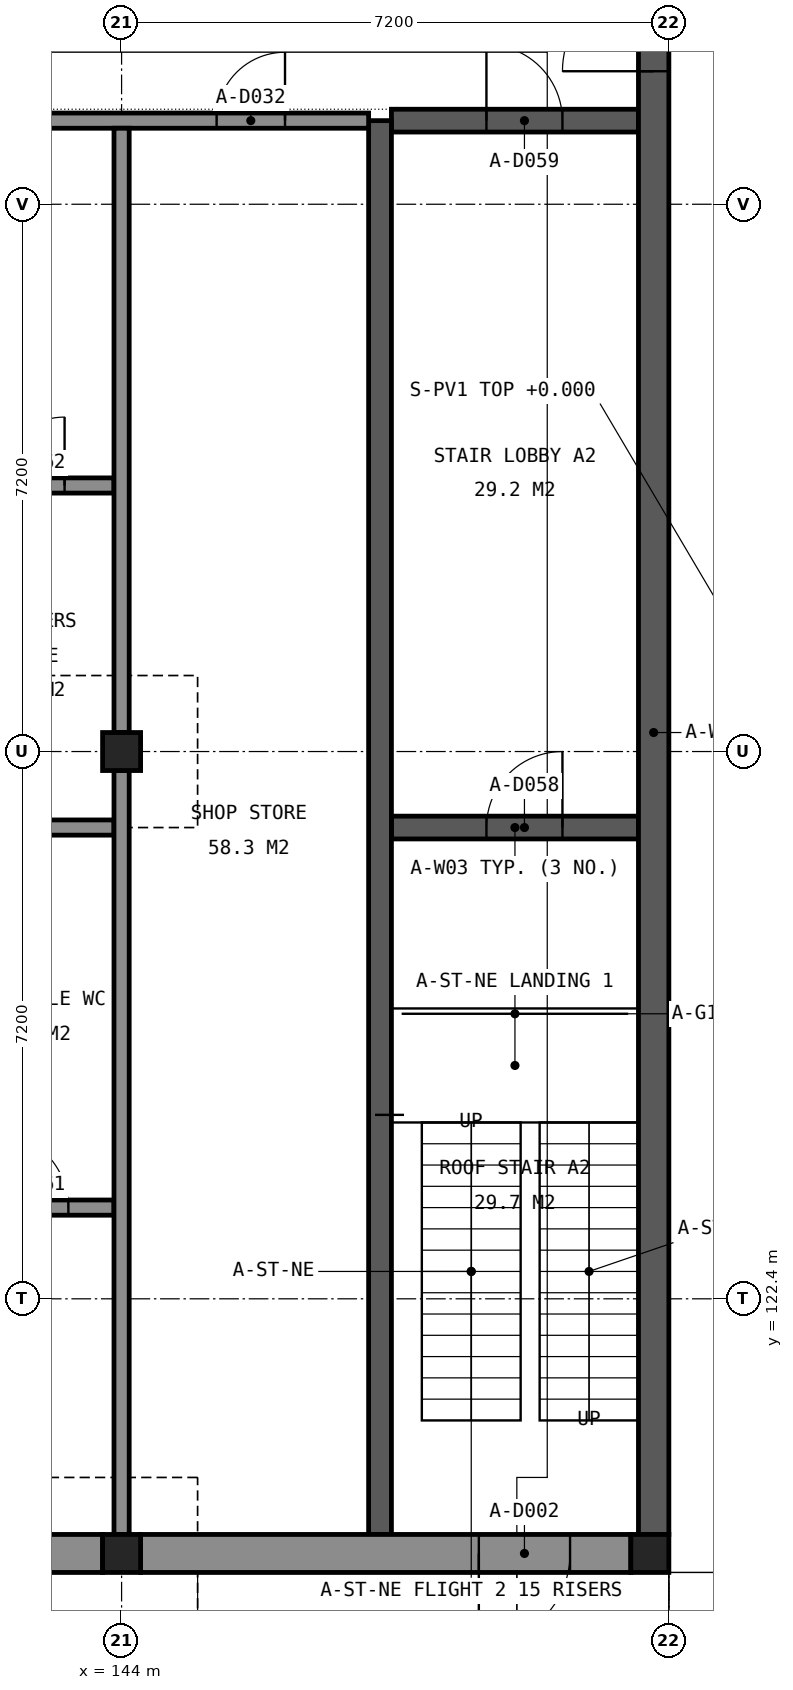
"""IFC4 building model, lengths in metres.
Left out: names, types, materials, properties, quantities, classifications, styles, units other than length and angle.
Written with IfcOpenShell. Run it as: python <this file> out.ifc"""

import sys

from ifc_helpers import new_model, si_unit, direction, frame, frame_2d, origin, origin_2d, place, context, subcontext, project, spatial, rectangle, extrude, element, fill, save


model = new_model("IFC4")
c1 = context("Model", 3, precision=1e-05, world=origin(), true_north=direction((0.0, 1.0)))
c2 = subcontext(c1, "Body", "Model", "MODEL_VIEW")
j1 = project(units=[si_unit("LENGTHUNIT", "METRE"), si_unit("PLANEANGLEUNIT", "RADIAN")], contexts=[c1])
p1 = place(None, origin())
s1 = spatial("IfcSite", under=j1, at=p1, CompositionType="ELEMENT")
p2 = place(p1, origin())
s2 = spatial("IfcBuilding", under=s1, at=p2, CompositionType="ELEMENT")
p3 = place(p2, origin())
s3 = spatial("IfcBuildingStorey", under=s2, at=p3, CompositionType="ELEMENT", Elevation=0.0)
for number, where, z_axis, x_axis in (
    (1, (144.0, 119.05, 0.0), (0.0, 0.0, 1.0), (1.0, 0.0, 0.0)),
    (2, (150.95, 119.05, 0.0), (0.0, 0.0, 1.0), (1.0, 0.0, 0.0)),
    (3, (144.0, 129.6, 0.0), (0.0, 0.0, 1.0), (1.0, 0.0, 0.0)),
):
    element("IfcColumn", number, at=place(p3, frame(where, z_axis=z_axis, x_axis=x_axis)), inside=s3, PredefinedType="COLUMN", context=c2, shape_type="SweptSolid", body=[
        extrude(rectangle(XDim=0.5, YDim=0.5, at=origin_2d()), origin(), (0.0, 0.0, 1.0), 3.7),
    ])
p4 = place(p3, frame((147.55, 128.6, 0.0), z_axis=(0.0, 0.0, 1.0), x_axis=(1.0, 0.0, 0.0)))
e4 = element("IfcWall", 4, at=p4, inside=s3, PredefinedType="SHEAR", context=c2, shape_type="SweptSolid", body=[
    extrude(rectangle(XDim=3.25, YDim=0.3, at=frame_2d((1.625, 0.0))), origin(), (0.0, 0.0, 1.0), 4.4),
])
p5 = place(p4, frame((1.25, 0.0, 0.0)))
e5 = element("IfcOpeningElement", 5, at=p5, cuts=e4, PredefinedType="OPENING", context=c2, shape_type="SweptSolid", body=[
    extrude(rectangle(XDim=1.0, YDim=2.1, at=frame_2d((0.5, 1.05))), frame((0.0, 0.16, 0.0), z_axis=(0.0, -1.0, 0.0), x_axis=(1.0, 0.0, 0.0)), (0.0, 0.0, 1.0), 0.32),
])
p6 = place(p3, frame((147.55, 137.9, 0.0), z_axis=(0.0, 0.0, 1.0), x_axis=(1.0, 0.0, 0.0)))
e6 = element("IfcWall", 6, at=p6, inside=s3, PredefinedType="SHEAR", context=c2, shape_type="SweptSolid", body=[
    extrude(rectangle(XDim=3.25, YDim=0.3, at=frame_2d((1.625, 0.0))), origin(), (0.0, 0.0, 1.0), 4.4),
])
p7 = place(p6, frame((1.25, 0.0, 0.0)))
e7 = element("IfcOpeningElement", 7, at=p7, cuts=e6, PredefinedType="OPENING", context=c2, shape_type="SweptSolid", body=[
    extrude(rectangle(XDim=1.0, YDim=2.1, at=frame_2d((0.5, 1.05))), frame((0.0, 0.16, 0.0), z_axis=(0.0, -1.0, 0.0), x_axis=(1.0, 0.0, 0.0)), (0.0, 0.0, 1.0), 0.32),
])
p8 = place(p3, frame((147.4, 119.3, 0.0), z_axis=(0.0, 0.0, 1.0), x_axis=(0.0, 1.0, 0.0)))
e8 = element("IfcWall", 8, at=p8, inside=s3, PredefinedType="SHEAR", context=c2, shape_type="SweptSolid", body=[
    extrude(rectangle(XDim=18.6, YDim=0.3, at=frame_2d((9.3, 0.0))), origin(), (0.0, 0.0, 1.0), 4.4),
])
p9 = place(p3, frame((151.0, 119.3, 0.0), z_axis=(0.0, 0.0, 1.0), x_axis=(0.0, 1.0, 0.0)))
e9 = element("IfcWall", 9, at=p9, inside=s3, PredefinedType="SHEAR", context=c2, shape_type="SweptSolid", body=[
    extrude(rectangle(XDim=21.1, YDim=0.4, at=frame_2d((10.55, 0.0))), origin(), (0.0, 0.0, 1.0), 4.4),
])
p10 = place(p9, frame((19.25, 0.0, 0.0)))
e10 = element("IfcOpeningElement", 10, at=p10, cuts=e9, PredefinedType="OPENING", context=c2, shape_type="SweptSolid", body=[
    extrude(rectangle(XDim=1.2, YDim=2.1, at=frame_2d((0.6, 1.05))), frame((0.0, 0.21, 0.0), z_axis=(0.0, -1.0, 0.0), x_axis=(1.0, 0.0, 0.0)), (0.0, 0.0, 1.0), 0.42),
])
p11 = place(p3, frame((137.05, 119.05, 0.0), z_axis=(0.0, 0.0, 1.0), x_axis=(1.0, 0.0, 0.0)))
e11 = element("IfcWall", 11, at=p11, inside=s3, PredefinedType="SOLIDWALL", context=c2, shape_type="SweptSolid", body=[
    extrude(rectangle(XDim=6.7, YDim=0.5, at=frame_2d((3.35, 0.0))), origin(), (0.0, 0.0, 1.0), 3.6),
])
p12 = place(p11, frame((2.75, 0.0, 0.0)))
e12 = element("IfcOpeningElement", 12, at=p12, cuts=e11, PredefinedType="OPENING", context=c2, shape_type="SweptSolid", body=[
    extrude(rectangle(XDim=1.2, YDim=2.1, at=frame_2d((0.6, 1.05))), frame((0.0, 0.26, 0.0), z_axis=(0.0, -1.0, 0.0), x_axis=(1.0, 0.0, 0.0)), (0.0, 0.0, 1.0), 0.52),
])
p13 = place(p3, frame((144.25, 119.05, 0.0), z_axis=(0.0, 0.0, 1.0), x_axis=(1.0, 0.0, 0.0)))
e13 = element("IfcWall", 13, at=p13, inside=s3, PredefinedType="SOLIDWALL", context=c2, shape_type="SweptSolid", body=[
    extrude(rectangle(XDim=6.45, YDim=0.5, at=frame_2d((3.225, 0.0))), origin(), (0.0, 0.0, 1.0), 3.6),
])
p14 = place(p13, frame((5.65, 0.0, 0.0), z_axis=(0.0, 0.0, 1.0), x_axis=(-1.0, 0.0, 0.0)))
e14 = element("IfcOpeningElement", 14, at=p14, cuts=e13, PredefinedType="OPENING", context=c2, shape_type="SweptSolid", body=[
    extrude(rectangle(XDim=1.2, YDim=2.1, at=frame_2d((0.6, 1.05))), frame((0.0, 0.26, 0.0), z_axis=(0.0, -1.0, 0.0), x_axis=(1.0, 0.0, 0.0)), (0.0, 0.0, 1.0), 0.52),
])
p15 = place(p3, frame((136.9, 123.6, 0.0), z_axis=(0.0, 0.0, 1.0), x_axis=(1.0, 0.0, 0.0)))
e15 = element("IfcWall", 15, at=p15, inside=s3, PredefinedType="PARTITIONING", context=c2, shape_type="SweptSolid", body=[
    extrude(rectangle(XDim=7.0, YDim=0.2, at=frame_2d((3.5, 0.0))), origin(), (0.0, 0.0, 1.0), 3.5),
])
p16 = place(p15, frame((1.8, 0.0, 0.0)))
e16 = element("IfcOpeningElement", 16, at=p16, cuts=e15, PredefinedType="OPENING", context=c2, shape_type="SweptSolid", body=[
    extrude(rectangle(XDim=1.0, YDim=2.1, at=frame_2d((0.5, 1.05))), frame((0.0, 0.11, 0.0), z_axis=(0.0, -1.0, 0.0), x_axis=(1.0, 0.0, 0.0)), (0.0, 0.0, 1.0), 0.22),
])
p17 = place(p15, frame((5.4, 0.0, 0.0)))
e17 = element("IfcOpeningElement", 17, at=p17, cuts=e15, PredefinedType="OPENING", context=c2, shape_type="SweptSolid", body=[
    extrude(rectangle(XDim=1.0, YDim=2.1, at=frame_2d((0.5, 1.05))), frame((0.0, 0.11, 0.0), z_axis=(0.0, -1.0, 0.0), x_axis=(1.0, 0.0, 0.0)), (0.0, 0.0, 1.0), 0.22),
])
p18 = place(p3, frame((141.7, 128.6, 0.0), z_axis=(0.0, 0.0, 1.0), x_axis=(1.0, 0.0, 0.0)))
e18 = element("IfcWall", 18, at=p18, inside=s3, PredefinedType="PARTITIONING", context=c2, shape_type="SweptSolid", body=[
    extrude(rectangle(XDim=2.2, YDim=0.2, at=frame_2d((1.1, 0.0))), origin(), (0.0, 0.0, 1.0), 3.5),
])
p19 = place(p3, frame((57.7, 133.1, 0.0), z_axis=(0.0, 0.0, 1.0), x_axis=(1.0, 0.0, 0.0)))
e19 = element("IfcWall", 19, at=p19, inside=s3, PredefinedType="PARTITIONING", context=c2, shape_type="SweptSolid", body=[
    extrude(rectangle(XDim=86.2, YDim=0.2, at=frame_2d((43.1, 0.0))), origin(), (0.0, 0.0, 1.0), 3.5),
])
p20 = place(p19, frame((3.0, 0.0, 0.0)))
e20 = element("IfcOpeningElement", 20, at=p20, cuts=e19, PredefinedType="OPENING", context=c2, shape_type="SweptSolid", body=[
    extrude(rectangle(XDim=1.0, YDim=2.1, at=frame_2d((0.5, 1.05))), frame((0.0, 0.11, 0.0), z_axis=(0.0, -1.0, 0.0), x_axis=(1.0, 0.0, 0.0)), (0.0, 0.0, 1.0), 0.22),
])
p21 = place(p19, frame((10.2, 0.0, 0.0)))
e21 = element("IfcOpeningElement", 21, at=p21, cuts=e19, PredefinedType="OPENING", context=c2, shape_type="SweptSolid", body=[
    extrude(rectangle(XDim=1.0, YDim=2.1, at=frame_2d((0.5, 1.05))), frame((0.0, 0.11, 0.0), z_axis=(0.0, -1.0, 0.0), x_axis=(1.0, 0.0, 0.0)), (0.0, 0.0, 1.0), 0.22),
])
p22 = place(p19, frame((17.4, 0.0, 0.0)))
e22 = element("IfcOpeningElement", 22, at=p22, cuts=e19, PredefinedType="OPENING", context=c2, shape_type="SweptSolid", body=[
    extrude(rectangle(XDim=1.0, YDim=2.1, at=frame_2d((0.5, 1.05))), frame((0.0, 0.11, 0.0), z_axis=(0.0, -1.0, 0.0), x_axis=(1.0, 0.0, 0.0)), (0.0, 0.0, 1.0), 0.22),
])
p23 = place(p19, frame((24.6, 0.0, 0.0)))
e23 = element("IfcOpeningElement", 23, at=p23, cuts=e19, PredefinedType="OPENING", context=c2, shape_type="SweptSolid", body=[
    extrude(rectangle(XDim=1.0, YDim=2.1, at=frame_2d((0.5, 1.05))), frame((0.0, 0.11, 0.0), z_axis=(0.0, -1.0, 0.0), x_axis=(1.0, 0.0, 0.0)), (0.0, 0.0, 1.0), 0.22),
])
p24 = place(p19, frame((31.8, 0.0, 0.0)))
e24 = element("IfcOpeningElement", 24, at=p24, cuts=e19, PredefinedType="OPENING", context=c2, shape_type="SweptSolid", body=[
    extrude(rectangle(XDim=1.0, YDim=2.1, at=frame_2d((0.5, 1.05))), frame((0.0, 0.11, 0.0), z_axis=(0.0, -1.0, 0.0), x_axis=(1.0, 0.0, 0.0)), (0.0, 0.0, 1.0), 0.22),
])
p25 = place(p19, frame((39.0, 0.0, 0.0)))
e25 = element("IfcOpeningElement", 25, at=p25, cuts=e19, PredefinedType="OPENING", context=c2, shape_type="SweptSolid", body=[
    extrude(rectangle(XDim=1.0, YDim=2.1, at=frame_2d((0.5, 1.05))), frame((0.0, 0.11, 0.0), z_axis=(0.0, -1.0, 0.0), x_axis=(1.0, 0.0, 0.0)), (0.0, 0.0, 1.0), 0.22),
])
p26 = place(p19, frame((46.2, 0.0, 0.0)))
e26 = element("IfcOpeningElement", 26, at=p26, cuts=e19, PredefinedType="OPENING", context=c2, shape_type="SweptSolid", body=[
    extrude(rectangle(XDim=1.0, YDim=2.1, at=frame_2d((0.5, 1.05))), frame((0.0, 0.11, 0.0), z_axis=(0.0, -1.0, 0.0), x_axis=(1.0, 0.0, 0.0)), (0.0, 0.0, 1.0), 0.22),
])
p27 = place(p19, frame((53.4, 0.0, 0.0)))
e27 = element("IfcOpeningElement", 27, at=p27, cuts=e19, PredefinedType="OPENING", context=c2, shape_type="SweptSolid", body=[
    extrude(rectangle(XDim=1.0, YDim=2.1, at=frame_2d((0.5, 1.05))), frame((0.0, 0.11, 0.0), z_axis=(0.0, -1.0, 0.0), x_axis=(1.0, 0.0, 0.0)), (0.0, 0.0, 1.0), 0.22),
])
p28 = place(p19, frame((60.6, 0.0, 0.0)))
e28 = element("IfcOpeningElement", 28, at=p28, cuts=e19, PredefinedType="OPENING", context=c2, shape_type="SweptSolid", body=[
    extrude(rectangle(XDim=1.0, YDim=2.1, at=frame_2d((0.5, 1.05))), frame((0.0, 0.11, 0.0), z_axis=(0.0, -1.0, 0.0), x_axis=(1.0, 0.0, 0.0)), (0.0, 0.0, 1.0), 0.22),
])
p29 = place(p19, frame((67.8, 0.0, 0.0)))
e29 = element("IfcOpeningElement", 29, at=p29, cuts=e19, PredefinedType="OPENING", context=c2, shape_type="SweptSolid", body=[
    extrude(rectangle(XDim=1.0, YDim=2.1, at=frame_2d((0.5, 1.05))), frame((0.0, 0.11, 0.0), z_axis=(0.0, -1.0, 0.0), x_axis=(1.0, 0.0, 0.0)), (0.0, 0.0, 1.0), 0.22),
])
p30 = place(p19, frame((75.0, 0.0, 0.0)))
e30 = element("IfcOpeningElement", 30, at=p30, cuts=e19, PredefinedType="OPENING", context=c2, shape_type="SweptSolid", body=[
    extrude(rectangle(XDim=1.0, YDim=2.1, at=frame_2d((0.5, 1.05))), frame((0.0, 0.11, 0.0), z_axis=(0.0, -1.0, 0.0), x_axis=(1.0, 0.0, 0.0)), (0.0, 0.0, 1.0), 0.22),
])
p31 = place(p19, frame((84.65, 0.0, 0.0)))
e31 = element("IfcOpeningElement", 31, at=p31, cuts=e19, PredefinedType="OPENING", context=c2, shape_type="SweptSolid", body=[
    extrude(rectangle(XDim=0.9, YDim=2.1, at=frame_2d((0.45, 1.05))), frame((0.0, 0.11, 0.0), z_axis=(0.0, -1.0, 0.0), x_axis=(1.0, 0.0, 0.0)), (0.0, 0.0, 1.0), 0.22),
])
p32 = place(p3, frame((54.35, 137.9, 0.0), z_axis=(0.0, 0.0, 1.0), x_axis=(1.0, 0.0, 0.0)))
e32 = element("IfcWall", 32, at=p32, inside=s3, PredefinedType="PARTITIONING", context=c2, shape_type="SweptSolid", body=[
    extrude(rectangle(XDim=92.9, YDim=0.2, at=frame_2d((46.45, 0.0))), origin(), (0.0, 0.0, 1.0), 3.5),
])
p33 = place(p32, frame((1.1, 0.0, 0.0)))
e33 = element("IfcOpeningElement", 33, at=p33, cuts=e32, PredefinedType="OPENING", context=c2, shape_type="SweptSolid", body=[
    extrude(rectangle(XDim=0.9, YDim=2.1, at=frame_2d((0.45, 1.05))), frame((0.0, 0.11, 0.0), z_axis=(0.0, -1.0, 0.0), x_axis=(1.0, 0.0, 0.0)), (0.0, 0.0, 1.0), 0.22),
])
p34 = place(p32, frame((90.9, 0.0, 0.0)))
e34 = element("IfcOpeningElement", 34, at=p34, cuts=e32, PredefinedType="OPENING", context=c2, shape_type="SweptSolid", body=[
    extrude(rectangle(XDim=0.9, YDim=2.1, at=frame_2d((0.45, 1.05))), frame((0.0, 0.11, 0.0), z_axis=(0.0, -1.0, 0.0), x_axis=(1.0, 0.0, 0.0)), (0.0, 0.0, 1.0), 0.22),
])
p35 = place(p32, frame((6.35, 0.0, 0.0)))
e35 = element("IfcOpeningElement", 35, at=p35, cuts=e32, PredefinedType="OPENING", context=c2, shape_type="SweptSolid", body=[
    extrude(rectangle(XDim=1.0, YDim=2.1, at=frame_2d((0.5, 1.05))), frame((0.0, 0.11, 0.0), z_axis=(0.0, -1.0, 0.0), x_axis=(1.0, 0.0, 0.0)), (0.0, 0.0, 1.0), 0.22),
])
p36 = place(p32, frame((13.55, 0.0, 0.0)))
e36 = element("IfcOpeningElement", 36, at=p36, cuts=e32, PredefinedType="OPENING", context=c2, shape_type="SweptSolid", body=[
    extrude(rectangle(XDim=1.0, YDim=2.1, at=frame_2d((0.5, 1.05))), frame((0.0, 0.11, 0.0), z_axis=(0.0, -1.0, 0.0), x_axis=(1.0, 0.0, 0.0)), (0.0, 0.0, 1.0), 0.22),
])
p37 = place(p32, frame((20.75, 0.0, 0.0)))
e37 = element("IfcOpeningElement", 37, at=p37, cuts=e32, PredefinedType="OPENING", context=c2, shape_type="SweptSolid", body=[
    extrude(rectangle(XDim=1.0, YDim=2.1, at=frame_2d((0.5, 1.05))), frame((0.0, 0.11, 0.0), z_axis=(0.0, -1.0, 0.0), x_axis=(1.0, 0.0, 0.0)), (0.0, 0.0, 1.0), 0.22),
])
p38 = place(p32, frame((27.95, 0.0, 0.0)))
e38 = element("IfcOpeningElement", 38, at=p38, cuts=e32, PredefinedType="OPENING", context=c2, shape_type="SweptSolid", body=[
    extrude(rectangle(XDim=1.0, YDim=2.1, at=frame_2d((0.5, 1.05))), frame((0.0, 0.11, 0.0), z_axis=(0.0, -1.0, 0.0), x_axis=(1.0, 0.0, 0.0)), (0.0, 0.0, 1.0), 0.22),
])
p39 = place(p32, frame((35.15, 0.0, 0.0)))
e39 = element("IfcOpeningElement", 39, at=p39, cuts=e32, PredefinedType="OPENING", context=c2, shape_type="SweptSolid", body=[
    extrude(rectangle(XDim=1.0, YDim=2.1, at=frame_2d((0.5, 1.05))), frame((0.0, 0.11, 0.0), z_axis=(0.0, -1.0, 0.0), x_axis=(1.0, 0.0, 0.0)), (0.0, 0.0, 1.0), 0.22),
])
p40 = place(p32, frame((42.35, 0.0, 0.0)))
e40 = element("IfcOpeningElement", 40, at=p40, cuts=e32, PredefinedType="OPENING", context=c2, shape_type="SweptSolid", body=[
    extrude(rectangle(XDim=1.0, YDim=2.1, at=frame_2d((0.5, 1.05))), frame((0.0, 0.11, 0.0), z_axis=(0.0, -1.0, 0.0), x_axis=(1.0, 0.0, 0.0)), (0.0, 0.0, 1.0), 0.22),
])
p41 = place(p32, frame((49.55, 0.0, 0.0)))
e41 = element("IfcOpeningElement", 41, at=p41, cuts=e32, PredefinedType="OPENING", context=c2, shape_type="SweptSolid", body=[
    extrude(rectangle(XDim=1.0, YDim=2.1, at=frame_2d((0.5, 1.05))), frame((0.0, 0.11, 0.0), z_axis=(0.0, -1.0, 0.0), x_axis=(1.0, 0.0, 0.0)), (0.0, 0.0, 1.0), 0.22),
])
p42 = place(p32, frame((56.75, 0.0, 0.0)))
e42 = element("IfcOpeningElement", 42, at=p42, cuts=e32, PredefinedType="OPENING", context=c2, shape_type="SweptSolid", body=[
    extrude(rectangle(XDim=1.0, YDim=2.1, at=frame_2d((0.5, 1.05))), frame((0.0, 0.11, 0.0), z_axis=(0.0, -1.0, 0.0), x_axis=(1.0, 0.0, 0.0)), (0.0, 0.0, 1.0), 0.22),
])
p43 = place(p32, frame((63.95, 0.0, 0.0)))
e43 = element("IfcOpeningElement", 43, at=p43, cuts=e32, PredefinedType="OPENING", context=c2, shape_type="SweptSolid", body=[
    extrude(rectangle(XDim=1.0, YDim=2.1, at=frame_2d((0.5, 1.05))), frame((0.0, 0.11, 0.0), z_axis=(0.0, -1.0, 0.0), x_axis=(1.0, 0.0, 0.0)), (0.0, 0.0, 1.0), 0.22),
])
p44 = place(p32, frame((71.15, 0.0, 0.0)))
e44 = element("IfcOpeningElement", 44, at=p44, cuts=e32, PredefinedType="OPENING", context=c2, shape_type="SweptSolid", body=[
    extrude(rectangle(XDim=1.0, YDim=2.1, at=frame_2d((0.5, 1.05))), frame((0.0, 0.11, 0.0), z_axis=(0.0, -1.0, 0.0), x_axis=(1.0, 0.0, 0.0)), (0.0, 0.0, 1.0), 0.22),
])
p45 = place(p32, frame((78.35, 0.0, 0.0)))
e45 = element("IfcOpeningElement", 45, at=p45, cuts=e32, PredefinedType="OPENING", context=c2, shape_type="SweptSolid", body=[
    extrude(rectangle(XDim=1.0, YDim=2.1, at=frame_2d((0.5, 1.05))), frame((0.0, 0.11, 0.0), z_axis=(0.0, -1.0, 0.0), x_axis=(1.0, 0.0, 0.0)), (0.0, 0.0, 1.0), 0.22),
])
p46 = place(p32, frame((85.55, 0.0, 0.0)))
e46 = element("IfcOpeningElement", 46, at=p46, cuts=e32, PredefinedType="OPENING", context=c2, shape_type="SweptSolid", body=[
    extrude(rectangle(XDim=1.0, YDim=2.1, at=frame_2d((0.5, 1.05))), frame((0.0, 0.11, 0.0), z_axis=(0.0, -1.0, 0.0), x_axis=(1.0, 0.0, 0.0)), (0.0, 0.0, 1.0), 0.22),
])
p47 = place(p3, frame((144.0, 119.3, 0.0), z_axis=(0.0, 0.0, 1.0), x_axis=(0.0, 1.0, 0.0)))
e47 = element("IfcWall", 47, at=p47, inside=s3, PredefinedType="PARTITIONING", context=c2, shape_type="SweptSolid", body=[
    extrude(rectangle(XDim=10.05, YDim=0.2, at=frame_2d((5.025, 0.0))), origin(), (0.0, 0.0, 1.0), 3.5),
])
p48 = place(p3, frame((144.0, 129.85, 0.0), z_axis=(0.0, 0.0, 1.0), x_axis=(0.0, 1.0, 0.0)))
e48 = element("IfcWall", 48, at=p48, inside=s3, PredefinedType="PARTITIONING", context=c2, shape_type="SweptSolid", body=[
    extrude(rectangle(XDim=7.95, YDim=0.2, at=frame_2d((3.975, 0.0))), origin(), (0.0, 0.0, 1.0), 3.5),
])
p49 = place(p14, origin())
e49 = element("IfcDoor", 49, at=p49, inside=s3, OperationType="SINGLE_SWING_RIGHT", PredefinedType="DOOR", context=c2, shape_type="SweptSolid", body=[
    extrude(rectangle(XDim=1.2, YDim=2.1, at=frame_2d((0.6, 1.05))), frame((0.0, 0.025, 0.0), z_axis=(0.0, -1.0, 0.0), x_axis=(1.0, 0.0, 0.0)), (0.0, 0.0, 1.0), 0.05),
])
fill(e14, e49)
p50 = place(p10, origin())
e50 = element("IfcDoor", 50, at=p50, inside=s3, OperationType="SINGLE_SWING_LEFT", PredefinedType="DOOR", context=c2, shape_type="SweptSolid", body=[
    extrude(rectangle(XDim=1.2, YDim=2.1, at=frame_2d((0.6, 1.05))), frame((0.0, 0.025, 0.0), z_axis=(0.0, -1.0, 0.0), x_axis=(1.0, 0.0, 0.0)), (0.0, 0.0, 1.0), 0.05),
])
fill(e10, e50)
p51 = place(p34, origin())
e51 = element("IfcDoor", 51, at=p51, inside=s3, OperationType="SINGLE_SWING_RIGHT", PredefinedType="DOOR", context=c2, shape_type="SweptSolid", body=[
    extrude(rectangle(XDim=0.9, YDim=2.1, at=frame_2d((0.45, 1.05))), frame((0.0, 0.025, 0.0), z_axis=(0.0, -1.0, 0.0), x_axis=(1.0, 0.0, 0.0)), (0.0, 0.0, 1.0), 0.05),
])
fill(e34, e51)
p52 = place(p5, origin())
e52 = element("IfcDoor", 52, at=p52, inside=s3, OperationType="SINGLE_SWING_RIGHT", PredefinedType="DOOR", context=c2, shape_type="SweptSolid", body=[
    extrude(rectangle(XDim=1.0, YDim=2.1, at=frame_2d((0.5, 1.05))), frame((0.0, 0.025, 0.0), z_axis=(0.0, -1.0, 0.0), x_axis=(1.0, 0.0, 0.0)), (0.0, 0.0, 1.0), 0.05),
])
fill(e5, e52)
p53 = place(p7, origin())
e53 = element("IfcDoor", 53, at=p53, inside=s3, OperationType="SINGLE_SWING_LEFT", PredefinedType="DOOR", context=c2, shape_type="SweptSolid", body=[
    extrude(rectangle(XDim=1.0, YDim=2.1, at=frame_2d((0.5, 1.05))), frame((0.0, 0.025, 0.0), z_axis=(0.0, -1.0, 0.0), x_axis=(1.0, 0.0, 0.0)), (0.0, 0.0, 1.0), 0.05),
])
fill(e7, e53)
p54 = place(p17, origin())
e54 = element("IfcDoor", 54, at=p54, inside=s3, OperationType="SINGLE_SWING_LEFT", PredefinedType="DOOR", context=c2, shape_type="SweptSolid", body=[
    extrude(rectangle(XDim=1.0, YDim=2.1, at=frame_2d((0.5, 1.05))), frame((0.0, 0.025, 0.0), z_axis=(0.0, -1.0, 0.0), x_axis=(1.0, 0.0, 0.0)), (0.0, 0.0, 1.0), 0.05),
])
fill(e17, e54)
p55 = place(p31, origin())
e55 = element("IfcDoor", 55, at=p55, inside=s3, OperationType="SINGLE_SWING_RIGHT", PredefinedType="DOOR", context=c2, shape_type="SweptSolid", body=[
    extrude(rectangle(XDim=0.9, YDim=2.1, at=frame_2d((0.45, 1.05))), frame((0.0, 0.025, 0.0), z_axis=(0.0, -1.0, 0.0), x_axis=(1.0, 0.0, 0.0)), (0.0, 0.0, 1.0), 0.05),
])
fill(e31, e55)
save(model, sys.argv[1])
